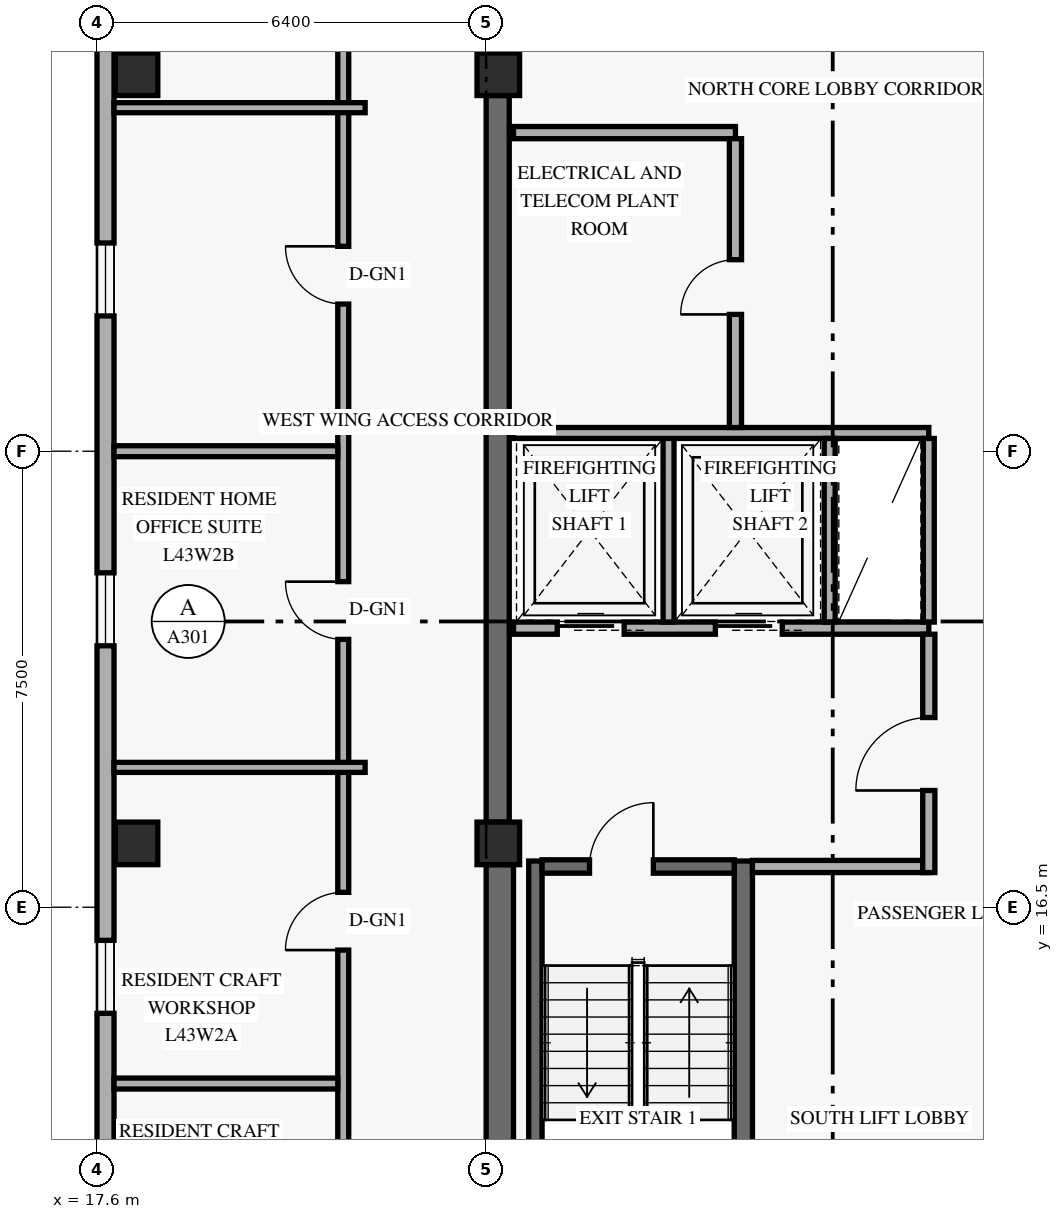
"""IFC4 building model, lengths in metres.
Left out: names, types, materials, properties, quantities, classifications, styles, units other than length and angle.
Written with IfcOpenShell. Run it as: python <this file> out.ifc"""

import sys

from ifc_helpers import new_model, si_unit, direction, frame, frame_2d, origin, origin_2d, place, context, subcontext, project, spatial, rectangle, extrude, element, fill, save


model = new_model("IFC4")
c1 = context("Model", 3, precision=1e-05, world=origin(), true_north=direction((0.0, 1.0)))
c2 = subcontext(c1, "Body", "Model", "MODEL_VIEW")
j1 = project(units=[si_unit("LENGTHUNIT", "METRE"), si_unit("PLANEANGLEUNIT", "RADIAN")], contexts=[c1])
p1 = place(None, origin())
s1 = spatial("IfcSite", under=j1, at=p1, CompositionType="ELEMENT")
p2 = place(p1, origin())
s2 = spatial("IfcBuilding", under=s1, at=p2, CompositionType="ELEMENT")
p3 = place(p2, frame((0.0, 0.0, 166.2)))
s3 = spatial("IfcBuildingStorey", under=s2, at=p3, CompositionType="ELEMENT", Elevation=166.2)
p4 = place(p3, frame((24.225, 9.6, 0.0), z_axis=(0.0, 0.0, 1.0), x_axis=(0.0, 1.0, 0.0)))
e1 = element("IfcWall", 1, at=p4, inside=s3, PredefinedType="SHEAR", context=c2, shape_type="SweptSolid", body=[
    extrude(rectangle(XDim=7.6, YDim=0.45, at=frame_2d((3.8, 0.0))), origin(), (0.0, 0.0, 1.0), 2.748),
])
p5 = place(p3, frame((24.19, 17.9, 0.0), z_axis=(0.0, 0.0, 1.0), x_axis=(0.0, 1.0, 0.0)))
e2 = element("IfcWall", 2, at=p5, inside=s3, PredefinedType="SHEAR", context=c2, shape_type="SweptSolid", body=[
    extrude(rectangle(XDim=11.95, YDim=0.38, at=frame_2d((5.975, 0.0))), origin(), (0.0, 0.0, 1.0), 2.748),
])
p6 = place(p3, frame((24.225, 30.55, 0.0), z_axis=(0.0, 0.0, 1.0), x_axis=(0.0, 1.0, 0.0)))
e3 = element("IfcWall", 3, at=p6, inside=s3, PredefinedType="SHEAR", context=c2, shape_type="SweptSolid", body=[
    extrude(rectangle(XDim=7.85, YDim=0.45, at=frame_2d((3.925, 0.0))), origin(), (0.0, 0.0, 1.0), 2.748),
])
p7 = place(p3, frame((24.81, 9.5, 0.0), z_axis=(0.0, 0.0, 1.0), x_axis=(0.0, 1.0, 0.0)))
e4 = element("IfcWall", 4, at=p7, inside=s3, PredefinedType="SHEAR", context=c2, shape_type="SweptSolid", body=[
    extrude(rectangle(XDim=7.76, YDim=0.22, at=frame_2d((3.88, 0.0))), origin(), (0.0, 0.0, 1.0), 3.36),
])
p8 = place(p3, frame((28.23, 9.5, 0.0), z_axis=(0.0, 0.0, 1.0), x_axis=(0.0, 1.0, 0.0)))
e5 = element("IfcWall", 5, at=p8, inside=s3, PredefinedType="SHEAR", context=c2, shape_type="SweptSolid", body=[
    extrude(rectangle(XDim=7.76, YDim=0.3, at=frame_2d((3.88, 0.0))), origin(), (0.0, 0.0, 1.0), 3.36),
])
p9 = place(p3, frame((24.92, 17.17, 0.0), z_axis=(0.0, 0.0, 1.0), x_axis=(1.0, 0.0, 0.0)))
e6 = element("IfcWall", 6, at=p9, inside=s3, PredefinedType="SHEAR", context=c2, shape_type="SweptSolid", body=[
    extrude(rectangle(XDim=3.16, YDim=0.22, at=frame_2d((1.58, 0.0))), origin(), (0.0, 0.0, 1.0), 3.36),
])
p10 = place(p9, frame((0.78, 0.0, 0.0)))
e7 = element("IfcOpeningElement", 7, at=p10, cuts=e6, PredefinedType="OPENING", context=c2, shape_type="SweptSolid", body=[
    extrude(rectangle(XDim=1.05, YDim=2.15, at=frame_2d((0.525, 1.075))), frame((0.0, 0.12, 0.0), z_axis=(0.0, -1.0, 0.0), x_axis=(1.0, 0.0, 0.0)), (0.0, 0.0, 1.0), 0.24),
])
for number, where, z_axis, x_axis in (
    (8, (18.25, 17.55, 0.0), (0.0, 0.0, 1.0), (1.0, 0.0, 0.0)),
    (9, (18.25, 30.2, 0.0), (0.0, 0.0, 1.0), (1.0, 0.0, 0.0)),
    (10, (24.2, 17.55, 0.0), (0.0, 0.0, 1.0), (1.0, 0.0, 0.0)),
    (11, (24.2, 30.2, 0.0), (0.0, 0.0, 1.0), (1.0, 0.0, 0.0)),
):
    element("IfcColumn", number, at=place(p3, frame(where, z_axis=z_axis, x_axis=x_axis)), inside=s3, PredefinedType="COLUMN", context=c2, shape_type="SweptSolid", body=[
        extrude(rectangle(XDim=0.7, YDim=0.7, at=origin_2d()), origin(), (0.0, 0.0, 1.0), 3.6),
    ])
p11 = place(p3, frame((17.74, 40.38, 0.0), z_axis=(0.0, 0.0, 1.0), x_axis=(0.0, -1.0, 0.0)))
e12 = element("IfcWall", 12, at=p11, inside=s3, PredefinedType="SOLIDWALL", context=c2, shape_type="SweptSolid", body=[
    extrude(rectangle(XDim=32.76, YDim=0.28, at=frame_2d((16.38, 0.0))), origin(), (0.0, 0.0, 1.0), 3.36),
])
p12 = place(p11, frame((28.135, 0.0, 0.85)))
e13 = element("IfcOpeningElement", 13, at=p12, cuts=e12, PredefinedType="OPENING", context=c2, shape_type="SweptSolid", body=[
    extrude(rectangle(XDim=1.2, YDim=1.5, at=frame_2d((0.6, 0.75))), frame((0.0, 0.15, 0.0), z_axis=(0.0, -1.0, 0.0), x_axis=(1.0, 0.0, 0.0)), (0.0, 0.0, 1.0), 0.3),
])
p13 = place(p11, frame((24.425, 0.0, 0.85)))
e14 = element("IfcOpeningElement", 14, at=p13, cuts=e12, PredefinedType="OPENING", context=c2, shape_type="SweptSolid", body=[
    extrude(rectangle(XDim=1.2, YDim=1.5, at=frame_2d((0.6, 0.75))), frame((0.0, 0.15, 0.0), z_axis=(0.0, -1.0, 0.0), x_axis=(1.0, 0.0, 0.0)), (0.0, 0.0, 1.0), 0.3),
])
p14 = place(p11, frame((18.38, 0.0, 0.85)))
e15 = element("IfcOpeningElement", 15, at=p14, cuts=e12, PredefinedType="OPENING", context=c2, shape_type="SweptSolid", body=[
    extrude(rectangle(XDim=1.2, YDim=1.5, at=frame_2d((0.6, 0.75))), frame((0.0, 0.15, 0.0), z_axis=(0.0, -1.0, 0.0), x_axis=(1.0, 0.0, 0.0)), (0.0, 0.0, 1.0), 0.3),
])
p15 = place(p11, frame((12.955, 0.0, 0.85)))
e16 = element("IfcOpeningElement", 16, at=p15, cuts=e12, PredefinedType="OPENING", context=c2, shape_type="SweptSolid", body=[
    extrude(rectangle(XDim=1.2, YDim=1.5, at=frame_2d((0.6, 0.75))), frame((0.0, 0.15, 0.0), z_axis=(0.0, -1.0, 0.0), x_axis=(1.0, 0.0, 0.0)), (0.0, 0.0, 1.0), 0.3),
])
p16 = place(p11, frame((7.26, 0.0, 0.85)))
e17 = element("IfcOpeningElement", 17, at=p16, cuts=e12, PredefinedType="OPENING", context=c2, shape_type="SweptSolid", body=[
    extrude(rectangle(XDim=1.2, YDim=1.5, at=frame_2d((0.6, 0.75))), frame((0.0, 0.15, 0.0), z_axis=(0.0, -1.0, 0.0), x_axis=(1.0, 0.0, 0.0)), (0.0, 0.0, 1.0), 0.3),
])
p17 = place(p11, frame((3.425, 0.0, 0.85)))
e18 = element("IfcOpeningElement", 18, at=p17, cuts=e12, PredefinedType="OPENING", context=c2, shape_type="SweptSolid", body=[
    extrude(rectangle(XDim=1.2, YDim=1.5, at=frame_2d((0.6, 0.75))), frame((0.0, 0.15, 0.0), z_axis=(0.0, -1.0, 0.0), x_axis=(1.0, 0.0, 0.0)), (0.0, 0.0, 1.0), 0.3),
])
p18 = place(p3, frame((24.45, 21.09, 0.0), z_axis=(0.0, 0.0, 1.0), x_axis=(1.0, 0.0, 0.0)))
e19 = element("IfcWall", 19, at=p18, inside=s3, PredefinedType="STANDARD", context=c2, shape_type="SweptSolid", body=[
    extrude(rectangle(XDim=6.83, YDim=0.2, at=frame_2d((3.415, 0.0))), origin(), (0.0, 0.0, 1.0), 3.36),
])
p19 = place(p18, frame((0.72, 0.0, 0.0)))
e20 = element("IfcOpeningElement", 20, at=p19, cuts=e19, PredefinedType="OPENING", context=c2, shape_type="SweptSolid", body=[
    extrude(rectangle(XDim=1.1, YDim=2.2, at=frame_2d((0.55, 1.1))), frame((0.0, 0.11, 0.0), z_axis=(0.0, -1.0, 0.0), x_axis=(1.0, 0.0, 0.0)), (0.0, 0.0, 1.0), 0.22),
])
p20 = place(p18, frame((3.32, 0.0, 0.0)))
e21 = element("IfcOpeningElement", 21, at=p20, cuts=e19, PredefinedType="OPENING", context=c2, shape_type="SweptSolid", body=[
    extrude(rectangle(XDim=1.1, YDim=2.2, at=frame_2d((0.55, 1.1))), frame((0.0, 0.11, 0.0), z_axis=(0.0, -1.0, 0.0), x_axis=(1.0, 0.0, 0.0)), (0.0, 0.0, 1.0), 0.22),
])
p21 = place(p3, frame((28.38, 17.17, 0.0), z_axis=(0.0, 0.0, 1.0), x_axis=(1.0, 0.0, 0.0)))
e22 = element("IfcWall", 22, at=p21, inside=s3, PredefinedType="STANDARD", context=c2, shape_type="SweptSolid", body=[
    extrude(rectangle(XDim=2.9, YDim=0.2, at=frame_2d((1.45, 0.0))), origin(), (0.0, 0.0, 1.0), 3.36),
])
p22 = place(p3, frame((31.28, 17.07, 0.0), z_axis=(0.0, 0.0, 1.0), x_axis=(0.0, 1.0, 0.0)))
e23 = element("IfcWall", 23, at=p22, inside=s3, PredefinedType="STANDARD", context=c2, shape_type="SweptSolid", body=[
    extrude(rectangle(XDim=3.92, YDim=0.2, at=frame_2d((1.96, 0.0))), origin(), (0.0, 0.0, 1.0), 2.73),
])
p23 = place(p22, frame((1.35, 0.0, 0.0)))
e24 = element("IfcOpeningElement", 24, at=p23, cuts=e23, PredefinedType="OPENING", context=c2, shape_type="SweptSolid", body=[
    extrude(rectangle(XDim=1.2, YDim=2.15, at=frame_2d((0.6, 1.075))), frame((0.0, 0.11, 0.0), z_axis=(0.0, -1.0, 0.0), x_axis=(1.0, 0.0, 0.0)), (0.0, 0.0, 1.0), 0.22),
])
p24 = place(p3, frame((27.0, 21.19, 0.0), z_axis=(0.0, 0.0, 1.0), x_axis=(0.0, 1.0, 0.0)))
e25 = element("IfcWall", 25, at=p24, inside=s3, PredefinedType="STANDARD", context=c2, shape_type="SweptSolid", body=[
    extrude(rectangle(XDim=3.11, YDim=0.18, at=frame_2d((1.555, 0.0))), origin(), (0.0, 0.0, 1.0), 3.36),
])
p25 = place(p3, frame((24.45, 24.3, 0.0), z_axis=(0.0, 0.0, 1.0), x_axis=(1.0, 0.0, 0.0)))
e26 = element("IfcWall", 26, at=p25, inside=s3, PredefinedType="STANDARD", context=c2, shape_type="SweptSolid", body=[
    extrude(rectangle(XDim=6.83, YDim=0.18, at=frame_2d((3.415, 0.0))), origin(), (0.0, 0.0, 1.0), 3.36),
])
for number, where, z_axis, x_axis in (
    (27, (29.65, 21.19, 0.0), (0.0, 0.0, 1.0), (0.0, 1.0, 0.0)),
    (28, (31.28, 21.19, 0.0), (0.0, 0.0, 1.0), (0.0, 1.0, 0.0)),
):
    element("IfcWall", number, at=place(p3, frame(where, z_axis=z_axis, x_axis=x_axis)), inside=s3, PredefinedType="STANDARD", context=c2, shape_type="SweptSolid", body=[
        extrude(rectangle(XDim=3.02, YDim=0.18, at=frame_2d((1.51, 0.0))), origin(), (0.0, 0.0, 1.0), 3.36),
    ])
p26 = place(p3, frame((24.45, 29.24, 0.0), z_axis=(0.0, 0.0, 1.0), x_axis=(1.0, 0.0, 0.0)))
e29 = element("IfcWall", 29, at=p26, inside=s3, PredefinedType="STANDARD", context=c2, shape_type="SweptSolid", body=[
    extrude(rectangle(XDim=3.65, YDim=0.2, at=frame_2d((1.825, 0.0))), origin(), (0.0, 0.0, 1.0), 3.36),
])
p27 = place(p3, frame((28.1, 24.39, 0.0), z_axis=(0.0, 0.0, 1.0), x_axis=(0.0, 1.0, 0.0)))
e30 = element("IfcWall", 30, at=p27, inside=s3, PredefinedType="STANDARD", context=c2, shape_type="SweptSolid", body=[
    extrude(rectangle(XDim=4.75, YDim=0.2, at=frame_2d((2.375, 0.0))), origin(), (0.0, 0.0, 1.0), 3.36),
])
p28 = place(p27, frame((1.86, 0.0, 0.0)))
e31 = element("IfcOpeningElement", 31, at=p28, cuts=e30, PredefinedType="OPENING", context=c2, shape_type="SweptSolid", body=[
    extrude(rectangle(XDim=0.9, YDim=2.1, at=frame_2d((0.45, 1.05))), frame((0.0, 0.11, 0.0), z_axis=(0.0, -1.0, 0.0), x_axis=(1.0, 0.0, 0.0)), (0.0, 0.0, 1.0), 0.22),
])
p29 = place(p3, frame((21.65, 6.8, 0.0), z_axis=(0.0, 0.0, 1.0), x_axis=(0.0, 1.0, 0.0)))
e32 = element("IfcWall", 32, at=p29, inside=s3, PredefinedType="STANDARD", context=c2, shape_type="SweptSolid", body=[
    extrude(rectangle(XDim=34.4, YDim=0.18, at=frame_2d((17.2, 0.0))), origin(), (0.0, 0.0, 1.0), 2.73),
])
p30 = place(p29, frame((0.3, 0.0, 0.0)))
e33 = element("IfcOpeningElement", 33, at=p30, cuts=e32, PredefinedType="OPENING", context=c2, shape_type="SweptSolid", body=[
    extrude(rectangle(XDim=0.95, YDim=2.15, at=frame_2d((0.475, 1.075))), frame((0.0, 0.1, 0.0), z_axis=(0.0, -1.0, 0.0), x_axis=(1.0, 0.0, 0.0)), (0.0, 0.0, 1.0), 0.2),
])
p31 = place(p29, frame((3.718, 0.0, 0.0)))
e34 = element("IfcOpeningElement", 34, at=p31, cuts=e32, PredefinedType="OPENING", context=c2, shape_type="SweptSolid", body=[
    extrude(rectangle(XDim=0.95, YDim=2.15, at=frame_2d((0.475, 1.075))), frame((0.0, 0.1, 0.0), z_axis=(0.0, -1.0, 0.0), x_axis=(1.0, 0.0, 0.0)), (0.0, 0.0, 1.0), 0.2),
])
p32 = place(p29, frame((8.995, 0.0, 0.0)))
e35 = element("IfcOpeningElement", 35, at=p32, cuts=e32, PredefinedType="OPENING", context=c2, shape_type="SweptSolid", body=[
    extrude(rectangle(XDim=0.95, YDim=2.15, at=frame_2d((0.475, 1.075))), frame((0.0, 0.1, 0.0), z_axis=(0.0, -1.0, 0.0), x_axis=(1.0, 0.0, 0.0)), (0.0, 0.0, 1.0), 0.2),
])
p33 = place(p29, frame((14.105, 0.0, 0.0)))
e36 = element("IfcOpeningElement", 36, at=p33, cuts=e32, PredefinedType="OPENING", context=c2, shape_type="SweptSolid", body=[
    extrude(rectangle(XDim=0.95, YDim=2.15, at=frame_2d((0.475, 1.075))), frame((0.0, 0.1, 0.0), z_axis=(0.0, -1.0, 0.0), x_axis=(1.0, 0.0, 0.0)), (0.0, 0.0, 1.0), 0.2),
])
p34 = place(p29, frame((19.62, 0.0, 0.0)))
e37 = element("IfcOpeningElement", 37, at=p34, cuts=e32, PredefinedType="OPENING", context=c2, shape_type="SweptSolid", body=[
    extrude(rectangle(XDim=0.95, YDim=2.15, at=frame_2d((0.475, 1.075))), frame((0.0, 0.1, 0.0), z_axis=(0.0, -1.0, 0.0), x_axis=(1.0, 0.0, 0.0)), (0.0, 0.0, 1.0), 0.2),
])
p35 = place(p29, frame((24.73, 0.0, 0.0)))
e38 = element("IfcOpeningElement", 38, at=p35, cuts=e32, PredefinedType="OPENING", context=c2, shape_type="SweptSolid", body=[
    extrude(rectangle(XDim=0.95, YDim=2.15, at=frame_2d((0.475, 1.075))), frame((0.0, 0.1, 0.0), z_axis=(0.0, -1.0, 0.0), x_axis=(1.0, 0.0, 0.0)), (0.0, 0.0, 1.0), 0.2),
])
p36 = place(p29, frame((29.333, 0.0, 0.0)))
e39 = element("IfcOpeningElement", 39, at=p36, cuts=e32, PredefinedType="OPENING", context=c2, shape_type="SweptSolid", body=[
    extrude(rectangle(XDim=0.95, YDim=2.15, at=frame_2d((0.475, 1.075))), frame((0.0, 0.1, 0.0), z_axis=(0.0, -1.0, 0.0), x_axis=(1.0, 0.0, 0.0)), (0.0, 0.0, 1.0), 0.2),
])
p37 = place(p29, frame((33.19, 0.0, 0.0)))
e40 = element("IfcOpeningElement", 40, at=p37, cuts=e32, PredefinedType="OPENING", context=c2, shape_type="SweptSolid", body=[
    extrude(rectangle(XDim=0.95, YDim=2.15, at=frame_2d((0.475, 1.075))), frame((0.0, 0.1, 0.0), z_axis=(0.0, -1.0, 0.0), x_axis=(1.0, 0.0, 0.0)), (0.0, 0.0, 1.0), 0.2),
])
p38 = place(p3, frame((17.88, 13.6, 0.0), z_axis=(0.0, 0.0, 1.0), x_axis=(1.0, 0.0, 0.0)))
e41 = element("IfcWall", 41, at=p38, inside=s3, PredefinedType="PARTITIONING", context=c2, shape_type="SweptSolid", body=[
    extrude(rectangle(XDim=3.68, YDim=0.18, at=frame_2d((1.84, 0.0))), origin(), (0.0, 0.0, 1.0), 2.879),
])
p39 = place(p3, frame((17.88, 18.8, 0.0), z_axis=(0.0, 0.0, 1.0), x_axis=(1.0, 0.0, 0.0)))
e42 = element("IfcWall", 42, at=p39, inside=s3, PredefinedType="PARTITIONING", context=c2, shape_type="SweptSolid", body=[
    extrude(rectangle(XDim=4.13, YDim=0.165, at=frame_2d((2.065, 0.0))), origin(), (0.0, 0.0, 1.0), 2.879),
])
p40 = place(p3, frame((17.88, 24.0, 0.0), z_axis=(0.0, 0.0, 1.0), x_axis=(1.0, 0.0, 0.0)))
e43 = element("IfcWall", 43, at=p40, inside=s3, PredefinedType="PARTITIONING", context=c2, shape_type="SweptSolid", body=[
    extrude(rectangle(XDim=3.68, YDim=0.18, at=frame_2d((1.84, 0.0))), origin(), (0.0, 0.0, 1.0), 2.879),
])
p41 = place(p3, frame((17.88, 29.65, 0.0), z_axis=(0.0, 0.0, 1.0), x_axis=(1.0, 0.0, 0.0)))
e44 = element("IfcWall", 44, at=p41, inside=s3, PredefinedType="PARTITIONING", context=c2, shape_type="SweptSolid", body=[
    extrude(rectangle(XDim=4.13, YDim=0.165, at=frame_2d((2.065, 0.0))), origin(), (0.0, 0.0, 1.0), 2.879),
])
p42 = place(p13, origin())
e45 = element("IfcWindow", 45, at=p42, inside=s3, PartitioningType="SINGLE_PANEL", PredefinedType="WINDOW", context=c2, shape_type="SweptSolid", body=[
    extrude(rectangle(XDim=1.2, YDim=1.5, at=frame_2d((0.6, 0.75))), frame((0.0, 0.03, 0.0), z_axis=(0.0, -1.0, 0.0), x_axis=(1.0, 0.0, 0.0)), (0.0, 0.0, 1.0), 0.06),
])
fill(e14, e45)
p43 = place(p14, origin())
e46 = element("IfcWindow", 46, at=p43, inside=s3, PartitioningType="SINGLE_PANEL", PredefinedType="WINDOW", context=c2, shape_type="SweptSolid", body=[
    extrude(rectangle(XDim=1.2, YDim=1.5, at=frame_2d((0.6, 0.75))), frame((0.0, 0.03, 0.0), z_axis=(0.0, -1.0, 0.0), x_axis=(1.0, 0.0, 0.0)), (0.0, 0.0, 1.0), 0.06),
])
fill(e15, e46)
p44 = place(p15, origin())
e47 = element("IfcWindow", 47, at=p44, inside=s3, PartitioningType="SINGLE_PANEL", PredefinedType="WINDOW", context=c2, shape_type="SweptSolid", body=[
    extrude(rectangle(XDim=1.2, YDim=1.5, at=frame_2d((0.6, 0.75))), frame((0.0, 0.03, 0.0), z_axis=(0.0, -1.0, 0.0), x_axis=(1.0, 0.0, 0.0)), (0.0, 0.0, 1.0), 0.06),
])
fill(e16, e47)
p45 = place(p10, frame((1.05, 0.0, 0.0), z_axis=(0.0, 0.0, 1.0), x_axis=(-1.0, 0.0, 0.0)))
e48 = element("IfcDoor", 48, at=p45, inside=s3, OperationType="SINGLE_SWING_LEFT", PredefinedType="DOOR", context=c2, shape_type="SweptSolid", body=[
    extrude(rectangle(XDim=1.05, YDim=2.15, at=frame_2d((0.525, 1.075))), frame((0.0, 0.025, 0.0), z_axis=(0.0, -1.0, 0.0), x_axis=(1.0, 0.0, 0.0)), (0.0, 0.0, 1.0), 0.05),
])
fill(e7, e48)
p46 = place(p19, origin())
e49 = element("IfcDoor", 49, at=p46, inside=s3, OperationType="SLIDING_TO_LEFT", PredefinedType="DOOR", context=c2, shape_type="SweptSolid", body=[
    extrude(rectangle(XDim=1.1, YDim=2.2, at=frame_2d((0.55, 1.1))), frame((0.0, 0.025, 0.0), z_axis=(0.0, -1.0, 0.0), x_axis=(1.0, 0.0, 0.0)), (0.0, 0.0, 1.0), 0.05),
])
fill(e20, e49)
p47 = place(p20, origin())
e50 = element("IfcDoor", 50, at=p47, inside=s3, OperationType="SLIDING_TO_LEFT", PredefinedType="DOOR", context=c2, shape_type="SweptSolid", body=[
    extrude(rectangle(XDim=1.1, YDim=2.2, at=frame_2d((0.55, 1.1))), frame((0.0, 0.025, 0.0), z_axis=(0.0, -1.0, 0.0), x_axis=(1.0, 0.0, 0.0)), (0.0, 0.0, 1.0), 0.05),
])
fill(e21, e50)
p48 = place(p23, origin())
e51 = element("IfcDoor", 51, at=p48, inside=s3, OperationType="SINGLE_SWING_LEFT", PredefinedType="DOOR", context=c2, shape_type="SweptSolid", body=[
    extrude(rectangle(XDim=1.2, YDim=2.15, at=frame_2d((0.6, 1.075))), frame((0.0, 0.025, 0.0), z_axis=(0.0, -1.0, 0.0), x_axis=(1.0, 0.0, 0.0)), (0.0, 0.0, 1.0), 0.05),
])
fill(e24, e51)
p49 = place(p28, origin())
e52 = element("IfcDoor", 52, at=p49, inside=s3, OperationType="SINGLE_SWING_LEFT", PredefinedType="DOOR", context=c2, shape_type="SweptSolid", body=[
    extrude(rectangle(XDim=0.9, YDim=2.1, at=frame_2d((0.45, 1.05))), frame((0.0, 0.025, 0.0), z_axis=(0.0, -1.0, 0.0), x_axis=(1.0, 0.0, 0.0)), (0.0, 0.0, 1.0), 0.05),
])
fill(e31, e52)
p50 = place(p32, origin())
e53 = element("IfcDoor", 53, at=p50, inside=s3, OperationType="SINGLE_SWING_LEFT", PredefinedType="DOOR", context=c2, shape_type="SweptSolid", body=[
    extrude(rectangle(XDim=0.95, YDim=2.15, at=frame_2d((0.475, 1.075))), frame((0.0, 0.025, 0.0), z_axis=(0.0, -1.0, 0.0), x_axis=(1.0, 0.0, 0.0)), (0.0, 0.0, 1.0), 0.05),
])
fill(e35, e53)
p51 = place(p33, origin())
e54 = element("IfcDoor", 54, at=p51, inside=s3, OperationType="SINGLE_SWING_RIGHT", PredefinedType="DOOR", context=c2, shape_type="SweptSolid", body=[
    extrude(rectangle(XDim=0.95, YDim=2.15, at=frame_2d((0.475, 1.075))), frame((0.0, 0.025, 0.0), z_axis=(0.0, -1.0, 0.0), x_axis=(1.0, 0.0, 0.0)), (0.0, 0.0, 1.0), 0.05),
])
fill(e36, e54)
p52 = place(p34, origin())
e55 = element("IfcDoor", 55, at=p52, inside=s3, OperationType="SINGLE_SWING_RIGHT", PredefinedType="DOOR", context=c2, shape_type="SweptSolid", body=[
    extrude(rectangle(XDim=0.95, YDim=2.15, at=frame_2d((0.475, 1.075))), frame((0.0, 0.025, 0.0), z_axis=(0.0, -1.0, 0.0), x_axis=(1.0, 0.0, 0.0)), (0.0, 0.0, 1.0), 0.05),
])
fill(e37, e55)
save(model, sys.argv[1])
